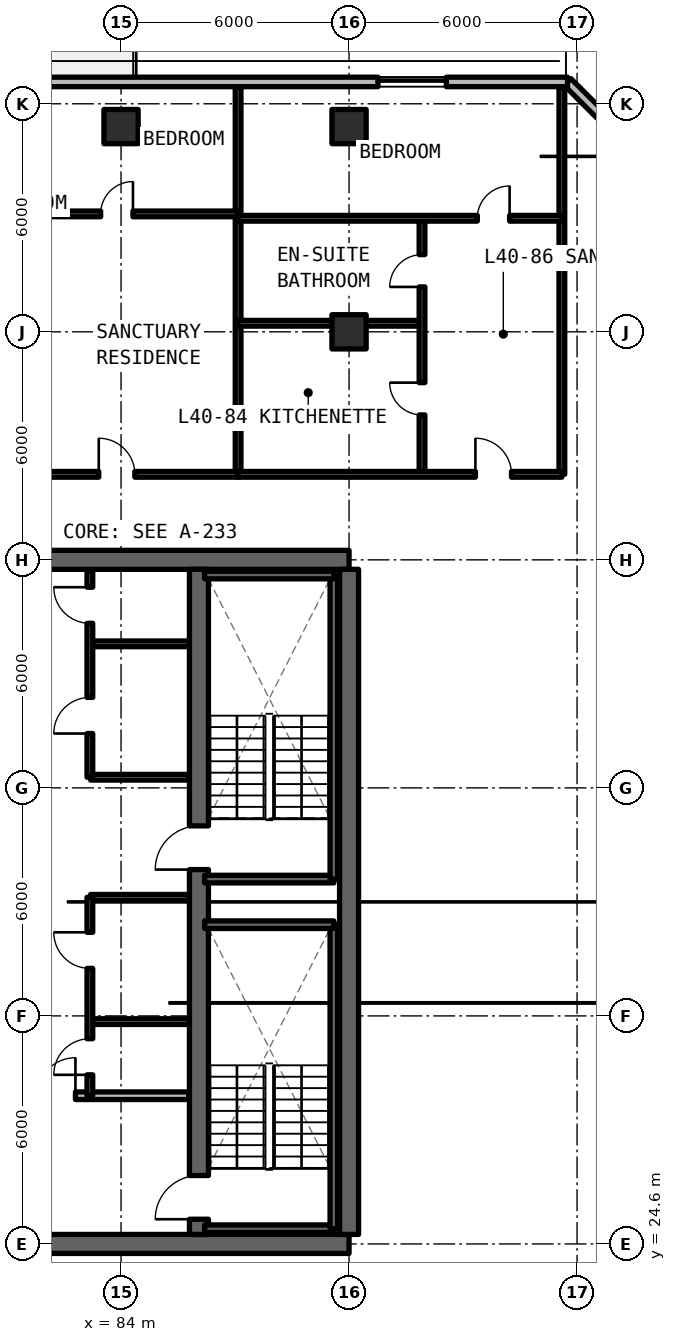
"""IFC4 building model, lengths in metres.
Left out: names, types, materials, properties, quantities, classifications, styles, units other than length and angle.
Written with IfcOpenShell. Run it as: python <this file> out.ifc"""

import sys

from ifc_helpers import new_model, si_unit, direction, frame, frame_2d, origin, origin_2d, place, context, subcontext, project, spatial, rectangle, extrude, element, fill, save


model = new_model("IFC4")
c1 = context("Model", 3, precision=1e-05, world=origin(), true_north=direction((0.0, 1.0)))
c2 = subcontext(c1, "Body", "Model", "MODEL_VIEW")
j1 = project(units=[si_unit("LENGTHUNIT", "METRE"), si_unit("PLANEANGLEUNIT", "RADIAN")], contexts=[c1])
p1 = place(None, origin())
s1 = spatial("IfcSite", under=j1, at=p1, CompositionType="ELEMENT")
p2 = place(p1, origin())
s2 = spatial("IfcBuilding", under=s1, at=p2, CompositionType="ELEMENT")
p3 = place(p2, frame((0.0, 0.0, 145.2)))
s3 = spatial("IfcBuildingStorey", under=s2, at=p3, CompositionType="ELEMENT", Elevation=145.2)
for number, where, z_axis, x_axis in (
    (1, (78.0, 24.6, 0.0), (0.0, 0.0, 1.0), (1.0, 0.0, 0.0)),
    (2, (90.0, 42.6, 0.0), (0.0, 0.0, 1.0), (-1.0, 0.0, 0.0)),
):
    element("IfcWall", number, at=place(p3, frame(where, z_axis=z_axis, x_axis=x_axis)), inside=s3, PredefinedType="SHEAR", context=c2, shape_type="SweptSolid", body=[
        extrude(rectangle(XDim=12.0, YDim=0.5, at=frame_2d((6.0, 0.0))), origin(), (0.0, 0.0, 1.0), 3.3),
    ])
p4 = place(p3, frame((90.0, 24.85, 0.0), z_axis=(0.0, 0.0, 1.0), x_axis=(0.0, 1.0, 0.0)))
e3 = element("IfcWall", 3, at=p4, inside=s3, PredefinedType="SHEAR", context=c2, shape_type="SweptSolid", body=[
    extrude(rectangle(XDim=17.5, YDim=0.5, at=frame_2d((8.75, 0.0))), origin(), (0.0, 0.0, 1.0), 3.3),
])
p5 = place(p3, frame((86.05, 24.85, 0.0), z_axis=(0.0, 0.0, 1.0), x_axis=(0.0, 1.0, 0.0)))
e4 = element("IfcWall", 4, at=p5, inside=s3, PredefinedType="SHEAR", context=c2, shape_type="SweptSolid", body=[
    extrude(rectangle(XDim=17.5, YDim=0.5, at=frame_2d((8.75, 0.0))), origin(), (0.0, 0.0, 1.0), 3.3),
])
p6 = place(p5, frame((0.4, 0.0, 0.0)))
e5 = element("IfcOpeningElement", 5, at=p6, cuts=e4, PredefinedType="OPENING", context=c2, shape_type="SweptSolid", body=[
    extrude(rectangle(XDim=1.15, YDim=2.15, at=frame_2d((0.575, 1.075))), frame((0.0, 0.26, 0.0), z_axis=(0.0, -1.0, 0.0), x_axis=(1.0, 0.0, 0.0)), (0.0, 0.0, 1.0), 0.52),
])
p7 = place(p5, frame((9.6, 0.0, 0.0)))
e6 = element("IfcOpeningElement", 6, at=p7, cuts=e4, PredefinedType="OPENING", context=c2, shape_type="SweptSolid", body=[
    extrude(rectangle(XDim=1.15, YDim=2.15, at=frame_2d((0.575, 1.075))), frame((0.0, 0.26, 0.0), z_axis=(0.0, -1.0, 0.0), x_axis=(1.0, 0.0, 0.0)), (0.0, 0.0, 1.0), 0.52),
])
for number, where, z_axis, x_axis in (
    (7, (90.0, 48.6, 0.0), (0.0, 0.0, 1.0), (1.0, 0.0, 0.0)),
    (8, (84.0, 54.0, 0.0), (0.0, 0.0, 1.0), (1.0, 0.0, 0.0)),
    (9, (90.0, 54.0, 0.0), (0.0, 0.0, 1.0), (1.0, 0.0, 0.0)),
):
    element("IfcColumn", number, at=place(p3, frame(where, z_axis=z_axis, x_axis=x_axis)), inside=s3, PredefinedType="COLUMN", context=c2, shape_type="SweptSolid", body=[
        extrude(rectangle(XDim=0.9, YDim=0.9, at=origin_2d()), origin(), (0.0, 0.0, 1.0), 3.3),
    ])
p8 = place(p3, frame((99.875, 51.048, 0.0), z_axis=(0.0, 0.0, 1.0), x_axis=(-0.70708586489, 0.707127696864, 0.0)))
e10 = element("IfcWall", 10, at=p8, inside=s3, PredefinedType="SOLIDWALL", context=c2, shape_type="SweptSolid", body=[
    extrude(rectangle(XDim=5.836, YDim=0.25, at=frame_2d((2.918, 0.0))), origin(), (0.0, 0.0, 1.0), 3.08),
])
p9 = place(p8, frame((1.218, 0.0, 0.78)))
e11 = element("IfcOpeningElement", 11, at=p9, cuts=e10, PredefinedType="OPENING", context=c2, shape_type="SweptSolid", body=[
    extrude(rectangle(XDim=3.4, YDim=1.66, at=frame_2d((1.7, 0.83))), frame((0.0, 0.135, 0.0), z_axis=(0.0, -1.0, 0.0), x_axis=(1.0, 0.0, 0.0)), (0.0, 0.0, 1.0), 0.27),
])
p10 = place(p3, frame((95.748, 55.175, 0.0), z_axis=(0.0, 0.0, 1.0), x_axis=(-1.0, 0.0, 0.0)))
e12 = element("IfcWall", 12, at=p10, inside=s3, PredefinedType="SOLIDWALL", context=c2, shape_type="SweptSolid", body=[
    extrude(rectangle(XDim=43.623, YDim=0.25, at=frame_2d((21.812, 0.0))), origin(), (0.0, 0.0, 1.0), 3.08),
])
p11 = place(p10, frame((26.748, 0.0, 0.0)))
e13 = element("IfcOpeningElement", 13, at=p11, cuts=e12, PredefinedType="OPENING", context=c2, shape_type="SweptSolid", body=[
    extrude(rectangle(XDim=1.1, YDim=2.15, at=frame_2d((0.55, 1.075))), frame((0.0, 0.135, 0.0), z_axis=(0.0, -1.0, 0.0), x_axis=(1.0, 0.0, 0.0)), (0.0, 0.0, 1.0), 0.27),
])
p12 = place(p10, frame((14.898, 0.0, 0.0)))
e14 = element("IfcOpeningElement", 14, at=p12, cuts=e12, PredefinedType="OPENING", context=c2, shape_type="SweptSolid", body=[
    extrude(rectangle(XDim=1.1, YDim=2.15, at=frame_2d((0.55, 1.075))), frame((0.0, 0.135, 0.0), z_axis=(0.0, -1.0, 0.0), x_axis=(1.0, 0.0, 0.0)), (0.0, 0.0, 1.0), 0.27),
])
p13 = place(p10, frame((38.468, 0.0, 0.78)))
e15 = element("IfcOpeningElement", 15, at=p13, cuts=e12, PredefinedType="OPENING", context=c2, shape_type="SweptSolid", body=[
    extrude(rectangle(XDim=1.8, YDim=1.66, at=frame_2d((0.9, 0.83))), frame((0.0, 0.135, 0.0), z_axis=(0.0, -1.0, 0.0), x_axis=(1.0, 0.0, 0.0)), (0.0, 0.0, 1.0), 0.27),
])
p14 = place(p10, frame((20.841, 0.0, 0.78)))
e16 = element("IfcOpeningElement", 16, at=p14, cuts=e12, PredefinedType="OPENING", context=c2, shape_type="SweptSolid", body=[
    extrude(rectangle(XDim=1.8, YDim=1.66, at=frame_2d((0.9, 0.83))), frame((0.0, 0.135, 0.0), z_axis=(0.0, -1.0, 0.0), x_axis=(1.0, 0.0, 0.0)), (0.0, 0.0, 1.0), 0.27),
])
p15 = place(p10, frame((3.188, 0.0, 0.78)))
e17 = element("IfcOpeningElement", 17, at=p15, cuts=e12, PredefinedType="OPENING", context=c2, shape_type="SweptSolid", body=[
    extrude(rectangle(XDim=1.8, YDim=1.66, at=frame_2d((0.9, 0.83))), frame((0.0, 0.135, 0.0), z_axis=(0.0, -1.0, 0.0), x_axis=(1.0, 0.0, 0.0)), (0.0, 0.0, 1.0), 0.27),
])
p16 = place(p3, frame((78.27, 28.5, 0.0), z_axis=(0.0, 0.0, 1.0), x_axis=(1.0, 0.0, 0.0)))
e18 = element("IfcWall", 18, at=p16, inside=s3, PredefinedType="SOLIDWALL", context=c2, shape_type="SweptSolid", body=[
    extrude(rectangle(XDim=7.51, YDim=0.2, at=frame_2d((3.755, 0.0))), origin(), (0.0, 0.0, 1.0), 2.35),
])
p17 = place(p16, frame((3.53, 0.0, 0.0)))
e19 = element("IfcOpeningElement", 19, at=p17, cuts=e18, PredefinedType="OPENING", context=c2, shape_type="SweptSolid", body=[
    extrude(rectangle(XDim=1.0, YDim=2.15, at=frame_2d((0.5, 1.075))), frame((0.0, 0.11, 0.0), z_axis=(0.0, -1.0, 0.0), x_axis=(1.0, 0.0, 0.0)), (0.0, 0.0, 1.0), 0.22),
])
for number, where, z_axis, x_axis in (
    (20, (83.2, 30.45, 0.0), (0.0, 0.0, 1.0), (1.0, 0.0, 0.0)),
    (21, (83.2, 33.72, 0.0), (0.0, 0.0, 1.0), (1.0, 0.0, 0.0)),
):
    element("IfcWall", number, at=place(p3, frame(where, z_axis=z_axis, x_axis=x_axis)), inside=s3, PredefinedType="SOLIDWALL", context=c2, shape_type="SweptSolid", body=[
        extrude(rectangle(XDim=2.58, YDim=0.15, at=frame_2d((1.29, 0.0))), origin(), (0.0, 0.0, 1.0), 2.35),
    ])
p18 = place(p3, frame((83.18, 28.5, 0.0), z_axis=(0.0, 0.0, 1.0), x_axis=(0.0, 1.0, 0.0)))
e22 = element("IfcWall", 22, at=p18, inside=s3, PredefinedType="SOLIDWALL", context=c2, shape_type="SweptSolid", body=[
    extrude(rectangle(XDim=5.22, YDim=0.15, at=frame_2d((2.61, 0.0))), origin(), (0.0, 0.0, 1.0), 2.35),
])
p19 = place(p18, frame((0.55, 0.0, 0.0)))
e23 = element("IfcOpeningElement", 23, at=p19, cuts=e22, PredefinedType="OPENING", context=c2, shape_type="SweptSolid", body=[
    extrude(rectangle(XDim=0.95, YDim=2.15, at=frame_2d((0.475, 1.075))), frame((0.0, 0.085, 0.0), z_axis=(0.0, -1.0, 0.0), x_axis=(1.0, 0.0, 0.0)), (0.0, 0.0, 1.0), 0.17),
])
p20 = place(p18, frame((3.35, 0.0, 0.0)))
e24 = element("IfcOpeningElement", 24, at=p20, cuts=e22, PredefinedType="OPENING", context=c2, shape_type="SweptSolid", body=[
    extrude(rectangle(XDim=0.95, YDim=2.15, at=frame_2d((0.475, 1.075))), frame((0.0, 0.085, 0.0), z_axis=(0.0, -1.0, 0.0), x_axis=(1.0, 0.0, 0.0)), (0.0, 0.0, 1.0), 0.17),
])
for number, where, z_axis, x_axis in (
    (25, (83.2, 36.88, 0.0), (0.0, 0.0, 1.0), (1.0, 0.0, 0.0)),
    (26, (83.2, 40.39, 0.0), (0.0, 0.0, 1.0), (1.0, 0.0, 0.0)),
):
    element("IfcWall", number, at=place(p3, frame(where, z_axis=z_axis, x_axis=x_axis)), inside=s3, PredefinedType="SOLIDWALL", context=c2, shape_type="SweptSolid", body=[
        extrude(rectangle(XDim=2.58, YDim=0.15, at=frame_2d((1.29, 0.0))), origin(), (0.0, 0.0, 1.0), 2.35),
    ])
p21 = place(p3, frame((83.18, 36.88, 0.0), z_axis=(0.0, 0.0, 1.0), x_axis=(0.0, 1.0, 0.0)))
e27 = element("IfcWall", 27, at=p21, inside=s3, PredefinedType="SOLIDWALL", context=c2, shape_type="SweptSolid", body=[
    extrude(rectangle(XDim=5.42, YDim=0.15, at=frame_2d((2.71, 0.0))), origin(), (0.0, 0.0, 1.0), 2.35),
])
p22 = place(p21, frame((1.15, 0.0, 0.0)))
e28 = element("IfcOpeningElement", 28, at=p22, cuts=e27, PredefinedType="OPENING", context=c2, shape_type="SweptSolid", body=[
    extrude(rectangle(XDim=0.95, YDim=2.15, at=frame_2d((0.475, 1.075))), frame((0.0, 0.085, 0.0), z_axis=(0.0, -1.0, 0.0), x_axis=(1.0, 0.0, 0.0)), (0.0, 0.0, 1.0), 0.17),
])
p23 = place(p21, frame((4.05, 0.0, 0.0)))
e29 = element("IfcOpeningElement", 29, at=p23, cuts=e27, PredefinedType="OPENING", context=c2, shape_type="SweptSolid", body=[
    extrude(rectangle(XDim=0.95, YDim=2.15, at=frame_2d((0.475, 1.075))), frame((0.0, 0.085, 0.0), z_axis=(0.0, -1.0, 0.0), x_axis=(1.0, 0.0, 0.0)), (0.0, 0.0, 1.0), 0.17),
])
for number, where, z_axis, x_axis in (
    (30, (95.6, 44.85, 0.0), (0.0, 0.0, 1.0), (0.0, 1.0, 0.0)),
    (31, (87.08, 44.85, 0.0), (0.0, 0.0, 1.0), (0.0, 1.0, 0.0)),
):
    element("IfcWall", number, at=place(p3, frame(where, z_axis=z_axis, x_axis=x_axis)), inside=s3, PredefinedType="SOLIDWALL", context=c2, shape_type="SweptSolid", body=[
        extrude(rectangle(XDim=10.2, YDim=0.15, at=frame_2d((5.1, 0.0))), origin(), (0.0, 0.0, 1.0), 2.35),
    ])
p24 = place(p3, frame((78.267, 51.703, 0.0), z_axis=(0.0, 0.0, 1.0), x_axis=(1.0, 0.0, 0.0)))
e32 = element("IfcWall", 32, at=p24, inside=s3, PredefinedType="PARTITIONING", context=c2, shape_type="SweptSolid", body=[
    extrude(rectangle(XDim=8.813, YDim=0.15, at=frame_2d((4.407, 0.0))), origin(), (0.0, 0.0, 1.0), 2.35),
])
p25 = place(p24, frame((5.197, 0.0, 0.0)))
e33 = element("IfcOpeningElement", 33, at=p25, cuts=e32, PredefinedType="OPENING", context=c2, shape_type="SweptSolid", body=[
    extrude(rectangle(XDim=0.85, YDim=2.1, at=frame_2d((0.425, 1.05))), frame((0.0, 0.085, 0.0), z_axis=(0.0, -1.0, 0.0), x_axis=(1.0, 0.0, 0.0)), (0.0, 0.0, 1.0), 0.17),
])
p26 = place(p3, frame((78.267, 44.85, 0.0), z_axis=(0.0, 0.0, 1.0), x_axis=(1.0, 0.0, 0.0)))
e34 = element("IfcWall", 34, at=p26, inside=s3, PredefinedType="SOLIDWALL", context=c2, shape_type="SweptSolid", body=[
    extrude(rectangle(XDim=8.813, YDim=0.15, at=frame_2d((4.407, 0.0))), origin(), (0.0, 0.0, 1.0), 2.35),
])
p27 = place(p26, frame((5.147, 0.0, 0.0)))
e35 = element("IfcOpeningElement", 35, at=p27, cuts=e34, PredefinedType="OPENING", context=c2, shape_type="SweptSolid", body=[
    extrude(rectangle(XDim=0.95, YDim=2.15, at=frame_2d((0.475, 1.075))), frame((0.0, 0.085, 0.0), z_axis=(0.0, -1.0, 0.0), x_axis=(1.0, 0.0, 0.0)), (0.0, 0.0, 1.0), 0.17),
])
p28 = place(p3, frame((87.08, 48.825, 0.0), z_axis=(0.0, 0.0, 1.0), x_axis=(1.0, 0.0, 0.0)))
e36 = element("IfcWall", 36, at=p28, inside=s3, PredefinedType="PARTITIONING", context=c2, shape_type="SweptSolid", body=[
    extrude(rectangle(XDim=4.84, YDim=0.15, at=frame_2d((2.42, 0.0))), origin(), (0.0, 0.0, 1.0), 2.35),
])
p29 = place(p3, frame((91.92, 44.85, 0.0), z_axis=(0.0, 0.0, 1.0), x_axis=(0.0, 1.0, 0.0)))
e37 = element("IfcWall", 37, at=p29, inside=s3, PredefinedType="PARTITIONING", context=c2, shape_type="SweptSolid", body=[
    extrude(rectangle(XDim=6.737, YDim=0.15, at=frame_2d((3.369, 0.0))), origin(), (0.0, 0.0, 1.0), 2.35),
])
p30 = place(p29, frame((1.562, 0.0, 0.0)))
e38 = element("IfcOpeningElement", 38, at=p30, cuts=e37, PredefinedType="OPENING", context=c2, shape_type="SweptSolid", body=[
    extrude(rectangle(XDim=0.85, YDim=2.1, at=frame_2d((0.425, 1.05))), frame((0.0, 0.085, 0.0), z_axis=(0.0, -1.0, 0.0), x_axis=(1.0, 0.0, 0.0)), (0.0, 0.0, 1.0), 0.17),
])
p31 = place(p29, frame((4.931, 0.0, 0.0)))
e39 = element("IfcOpeningElement", 39, at=p31, cuts=e37, PredefinedType="OPENING", context=c2, shape_type="SweptSolid", body=[
    extrude(rectangle(XDim=0.85, YDim=2.1, at=frame_2d((0.425, 1.05))), frame((0.0, 0.085, 0.0), z_axis=(0.0, -1.0, 0.0), x_axis=(1.0, 0.0, 0.0)), (0.0, 0.0, 1.0), 0.17),
])
p32 = place(p3, frame((87.08, 51.587, 0.0), z_axis=(0.0, 0.0, 1.0), x_axis=(1.0, 0.0, 0.0)))
e40 = element("IfcWall", 40, at=p32, inside=s3, PredefinedType="PARTITIONING", context=c2, shape_type="SweptSolid", body=[
    extrude(rectangle(XDim=8.52, YDim=0.15, at=frame_2d((4.26, 0.0))), origin(), (0.0, 0.0, 1.0), 2.35),
])
p33 = place(p32, frame((6.295, 0.0, 0.0)))
e41 = element("IfcOpeningElement", 41, at=p33, cuts=e40, PredefinedType="OPENING", context=c2, shape_type="SweptSolid", body=[
    extrude(rectangle(XDim=0.85, YDim=2.1, at=frame_2d((0.425, 1.05))), frame((0.0, 0.085, 0.0), z_axis=(0.0, -1.0, 0.0), x_axis=(1.0, 0.0, 0.0)), (0.0, 0.0, 1.0), 0.17),
])
p34 = place(p3, frame((87.08, 44.85, 0.0), z_axis=(0.0, 0.0, 1.0), x_axis=(1.0, 0.0, 0.0)))
e42 = element("IfcWall", 42, at=p34, inside=s3, PredefinedType="SOLIDWALL", context=c2, shape_type="SweptSolid", body=[
    extrude(rectangle(XDim=8.52, YDim=0.15, at=frame_2d((4.26, 0.0))), origin(), (0.0, 0.0, 1.0), 2.35),
])
p35 = place(p34, frame((6.245, 0.0, 0.0)))
e43 = element("IfcOpeningElement", 43, at=p35, cuts=e42, PredefinedType="OPENING", context=c2, shape_type="SweptSolid", body=[
    extrude(rectangle(XDim=0.95, YDim=2.15, at=frame_2d((0.475, 1.075))), frame((0.0, 0.085, 0.0), z_axis=(0.0, -1.0, 0.0), x_axis=(1.0, 0.0, 0.0)), (0.0, 0.0, 1.0), 0.17),
])
p36 = place(p3, frame((86.2, 25.0, 0.0), z_axis=(0.0, 0.0, 1.0), x_axis=(1.0, 0.0, 0.0)))
e44 = element("IfcWall", 44, at=p36, inside=s3, PredefinedType="SOLIDWALL", context=c2, shape_type="SweptSolid", body=[
    extrude(rectangle(XDim=3.4, YDim=0.2, at=frame_2d((1.7, 0.0))), origin(), (0.0, 0.0, 1.0), 3.3),
])
p37 = place(p3, frame((89.6, 25.0, 0.0), z_axis=(0.0, 0.0, 1.0), x_axis=(0.0, 1.0, 0.0)))
e45 = element("IfcWall", 45, at=p37, inside=s3, PredefinedType="SOLIDWALL", context=c2, shape_type="SweptSolid", body=[
    extrude(rectangle(XDim=8.0, YDim=0.2, at=frame_2d((4.0, 0.0))), origin(), (0.0, 0.0, 1.0), 3.3),
])
for number, where, z_axis, x_axis in (
    (46, (89.6, 33.0, 0.0), (0.0, 0.0, 1.0), (-1.0, 0.0, 0.0)),
    (47, (86.2, 34.2, 0.0), (0.0, 0.0, 1.0), (1.0, 0.0, 0.0)),
):
    element("IfcWall", number, at=place(p3, frame(where, z_axis=z_axis, x_axis=x_axis)), inside=s3, PredefinedType="SOLIDWALL", context=c2, shape_type="SweptSolid", body=[
        extrude(rectangle(XDim=3.4, YDim=0.2, at=frame_2d((1.7, 0.0))), origin(), (0.0, 0.0, 1.0), 3.3),
    ])
p38 = place(p3, frame((89.6, 34.2, 0.0), z_axis=(0.0, 0.0, 1.0), x_axis=(0.0, 1.0, 0.0)))
e48 = element("IfcWall", 48, at=p38, inside=s3, PredefinedType="SOLIDWALL", context=c2, shape_type="SweptSolid", body=[
    extrude(rectangle(XDim=8.0, YDim=0.2, at=frame_2d((4.0, 0.0))), origin(), (0.0, 0.0, 1.0), 3.3),
])
p39 = place(p3, frame((89.6, 42.2, 0.0), z_axis=(0.0, 0.0, 1.0), x_axis=(-1.0, 0.0, 0.0)))
e49 = element("IfcWall", 49, at=p39, inside=s3, PredefinedType="SOLIDWALL", context=c2, shape_type="SweptSolid", body=[
    extrude(rectangle(XDim=3.4, YDim=0.2, at=frame_2d((1.7, 0.0))), origin(), (0.0, 0.0, 1.0), 3.3),
])
p40 = place(p15, origin())
e50 = element("IfcWindow", 50, at=p40, inside=s3, PartitioningType="SINGLE_PANEL", PredefinedType="WINDOW", context=c2, shape_type="SweptSolid", body=[
    extrude(rectangle(XDim=1.8, YDim=1.66, at=frame_2d((0.9, 0.83))), frame((0.0, 0.03, 0.0), z_axis=(0.0, -1.0, 0.0), x_axis=(1.0, 0.0, 0.0)), (0.0, 0.0, 1.0), 0.06),
])
fill(e17, e50)
p41 = place(p17, origin())
e51 = element("IfcDoor", 51, at=p41, inside=s3, OperationType="SINGLE_SWING_RIGHT", PredefinedType="DOOR", context=c2, shape_type="SweptSolid", body=[
    extrude(rectangle(XDim=1.0, YDim=2.15, at=frame_2d((0.5, 1.075))), frame((0.0, 0.025, 0.0), z_axis=(0.0, -1.0, 0.0), x_axis=(1.0, 0.0, 0.0)), (0.0, 0.0, 1.0), 0.05),
])
fill(e19, e51)
p42 = place(p19, origin())
e52 = element("IfcDoor", 52, at=p42, inside=s3, OperationType="SINGLE_SWING_LEFT", PredefinedType="DOOR", context=c2, shape_type="SweptSolid", body=[
    extrude(rectangle(XDim=0.95, YDim=2.15, at=frame_2d((0.475, 1.075))), frame((0.0, 0.025, 0.0), z_axis=(0.0, -1.0, 0.0), x_axis=(1.0, 0.0, 0.0)), (0.0, 0.0, 1.0), 0.05),
])
fill(e23, e52)
p43 = place(p20, origin())
e53 = element("IfcDoor", 53, at=p43, inside=s3, OperationType="SINGLE_SWING_RIGHT", PredefinedType="DOOR", context=c2, shape_type="SweptSolid", body=[
    extrude(rectangle(XDim=0.95, YDim=2.15, at=frame_2d((0.475, 1.075))), frame((0.0, 0.025, 0.0), z_axis=(0.0, -1.0, 0.0), x_axis=(1.0, 0.0, 0.0)), (0.0, 0.0, 1.0), 0.05),
])
fill(e24, e53)
p44 = place(p22, origin())
e54 = element("IfcDoor", 54, at=p44, inside=s3, OperationType="SINGLE_SWING_LEFT", PredefinedType="DOOR", context=c2, shape_type="SweptSolid", body=[
    extrude(rectangle(XDim=0.95, YDim=2.15, at=frame_2d((0.475, 1.075))), frame((0.0, 0.025, 0.0), z_axis=(0.0, -1.0, 0.0), x_axis=(1.0, 0.0, 0.0)), (0.0, 0.0, 1.0), 0.05),
])
fill(e28, e54)
p45 = place(p23, origin())
e55 = element("IfcDoor", 55, at=p45, inside=s3, OperationType="SINGLE_SWING_RIGHT", PredefinedType="DOOR", context=c2, shape_type="SweptSolid", body=[
    extrude(rectangle(XDim=0.95, YDim=2.15, at=frame_2d((0.475, 1.075))), frame((0.0, 0.025, 0.0), z_axis=(0.0, -1.0, 0.0), x_axis=(1.0, 0.0, 0.0)), (0.0, 0.0, 1.0), 0.05),
])
fill(e29, e55)
p46 = place(p25, origin())
e56 = element("IfcDoor", 56, at=p46, inside=s3, OperationType="SINGLE_SWING_RIGHT", PredefinedType="DOOR", context=c2, shape_type="SweptSolid", body=[
    extrude(rectangle(XDim=0.85, YDim=2.1, at=frame_2d((0.425, 1.05))), frame((0.0, 0.025, 0.0), z_axis=(0.0, -1.0, 0.0), x_axis=(1.0, 0.0, 0.0)), (0.0, 0.0, 1.0), 0.05),
])
fill(e33, e56)
p47 = place(p27, origin())
e57 = element("IfcDoor", 57, at=p47, inside=s3, OperationType="SINGLE_SWING_LEFT", PredefinedType="DOOR", context=c2, shape_type="SweptSolid", body=[
    extrude(rectangle(XDim=0.95, YDim=2.15, at=frame_2d((0.475, 1.075))), frame((0.0, 0.025, 0.0), z_axis=(0.0, -1.0, 0.0), x_axis=(1.0, 0.0, 0.0)), (0.0, 0.0, 1.0), 0.05),
])
fill(e35, e57)
p48 = place(p30, origin())
e58 = element("IfcDoor", 58, at=p48, inside=s3, OperationType="SINGLE_SWING_RIGHT", PredefinedType="DOOR", context=c2, shape_type="SweptSolid", body=[
    extrude(rectangle(XDim=0.85, YDim=2.1, at=frame_2d((0.425, 1.05))), frame((0.0, 0.025, 0.0), z_axis=(0.0, -1.0, 0.0), x_axis=(1.0, 0.0, 0.0)), (0.0, 0.0, 1.0), 0.05),
])
fill(e38, e58)
p49 = place(p31, origin())
e59 = element("IfcDoor", 59, at=p49, inside=s3, OperationType="SINGLE_SWING_LEFT", PredefinedType="DOOR", context=c2, shape_type="SweptSolid", body=[
    extrude(rectangle(XDim=0.85, YDim=2.1, at=frame_2d((0.425, 1.05))), frame((0.0, 0.025, 0.0), z_axis=(0.0, -1.0, 0.0), x_axis=(1.0, 0.0, 0.0)), (0.0, 0.0, 1.0), 0.05),
])
fill(e39, e59)
p50 = place(p33, origin())
e60 = element("IfcDoor", 60, at=p50, inside=s3, OperationType="SINGLE_SWING_RIGHT", PredefinedType="DOOR", context=c2, shape_type="SweptSolid", body=[
    extrude(rectangle(XDim=0.85, YDim=2.1, at=frame_2d((0.425, 1.05))), frame((0.0, 0.025, 0.0), z_axis=(0.0, -1.0, 0.0), x_axis=(1.0, 0.0, 0.0)), (0.0, 0.0, 1.0), 0.05),
])
fill(e41, e60)
p51 = place(p35, origin())
e61 = element("IfcDoor", 61, at=p51, inside=s3, OperationType="SINGLE_SWING_LEFT", PredefinedType="DOOR", context=c2, shape_type="SweptSolid", body=[
    extrude(rectangle(XDim=0.95, YDim=2.15, at=frame_2d((0.475, 1.075))), frame((0.0, 0.025, 0.0), z_axis=(0.0, -1.0, 0.0), x_axis=(1.0, 0.0, 0.0)), (0.0, 0.0, 1.0), 0.05),
])
fill(e43, e61)
p52 = place(p6, origin())
e62 = element("IfcDoor", 62, at=p52, inside=s3, OperationType="SINGLE_SWING_RIGHT", PredefinedType="DOOR", context=c2, shape_type="SweptSolid", body=[
    extrude(rectangle(XDim=1.15, YDim=2.15, at=frame_2d((0.575, 1.075))), frame((0.0, 0.025, 0.0), z_axis=(0.0, -1.0, 0.0), x_axis=(1.0, 0.0, 0.0)), (0.0, 0.0, 1.0), 0.05),
])
fill(e5, e62)
p53 = place(p7, origin())
e63 = element("IfcDoor", 63, at=p53, inside=s3, OperationType="SINGLE_SWING_LEFT", PredefinedType="DOOR", context=c2, shape_type="SweptSolid", body=[
    extrude(rectangle(XDim=1.15, YDim=2.15, at=frame_2d((0.575, 1.075))), frame((0.0, 0.025, 0.0), z_axis=(0.0, -1.0, 0.0), x_axis=(1.0, 0.0, 0.0)), (0.0, 0.0, 1.0), 0.05),
])
fill(e6, e63)
save(model, sys.argv[1])
